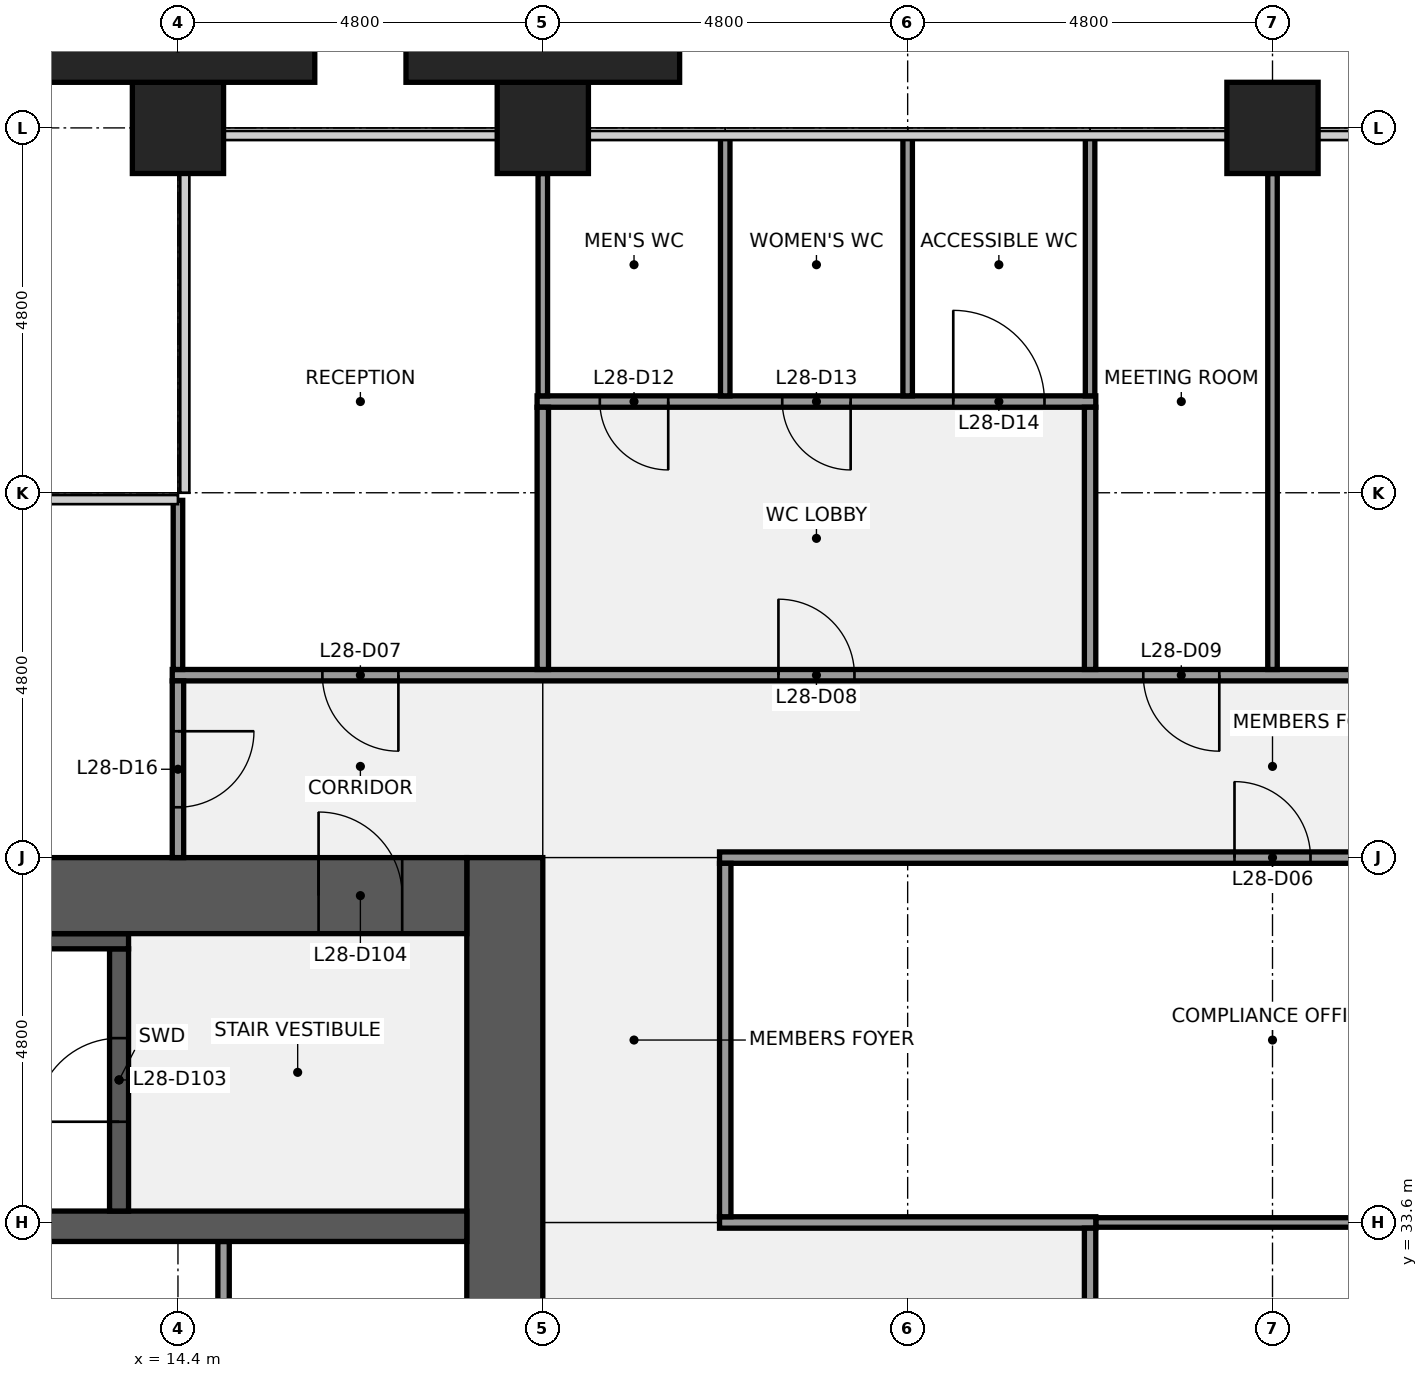
"""IFC4 building model, lengths in metres.
Left out: names, types, materials, properties, quantities, classifications, styles, units other than length and angle.
Written with IfcOpenShell. Run it as: python <this file> out.ifc"""

import sys

from ifc_helpers import new_model, si_unit, direction, frame, frame_2d, origin, origin_2d, place, context, subcontext, project, spatial, rectangle, extrude, element, fill, save


model = new_model("IFC4")
c1 = context("Model", 3, precision=1e-05, world=origin(), true_north=direction((0.0, 1.0)))
c2 = subcontext(c1, "Body", "Model", "MODEL_VIEW")
j1 = project(units=[si_unit("LENGTHUNIT", "METRE"), si_unit("PLANEANGLEUNIT", "RADIAN")], contexts=[c1])
p1 = place(None, origin())
s1 = spatial("IfcSite", under=j1, at=p1, CompositionType="ELEMENT")
p2 = place(p1, origin())
s2 = spatial("IfcBuilding", under=s1, at=p2, CompositionType="ELEMENT")
p3 = place(p2, frame((0.0, 0.0, 132.1)))
s3 = spatial("IfcBuildingStorey", under=s2, at=p3, CompositionType="ELEMENT", Elevation=132.1)
for number, where, z_axis, x_axis in (
    (1, (14.4, 48.0, 0.0), (0.0, 0.0, 1.0), (1.0, 0.0, 0.0)),
    (2, (19.2, 48.0, 0.0), (0.0, 0.0, 1.0), (1.0, 0.0, 0.0)),
    (3, (28.8, 48.0, 0.0), (0.0, 0.0, 1.0), (1.0, 0.0, 0.0)),
):
    element("IfcColumn", number, at=place(p3, frame(where, z_axis=z_axis, x_axis=x_axis)), inside=s3, PredefinedType="COLUMN", context=c2, shape_type="SweptSolid", body=[
        extrude(rectangle(XDim=1.2, YDim=1.2, at=origin_2d()), origin(), (0.0, 0.0, 1.0), 4.0),
    ])
p4 = place(p3, frame((18.7, 38.4, 0.0), z_axis=(0.0, 0.0, 1.0), x_axis=(0.0, -1.0, 0.0)))
e4 = element("IfcWall", 4, at=p4, inside=s3, PredefinedType="SHEAR", context=c2, shape_type="SweptSolid", body=[
    extrude(rectangle(XDim=28.8, YDim=1.0, at=frame_2d((14.4, 0.0))), origin(), (0.0, 0.0, 1.0), 3.84),
])
p5 = place(p4, frame((18.3, 0.0, 0.0)))
e5 = element("IfcOpeningElement", 5, at=p5, cuts=e4, PredefinedType="OPENING", context=c2, shape_type="SweptSolid", body=[
    extrude(rectangle(XDim=1.8, YDim=2.1, at=frame_2d((0.9, 1.05))), frame((0.0, 0.51, 0.0), z_axis=(0.0, -1.0, 0.0), x_axis=(1.0, 0.0, 0.0)), (0.0, 0.0, 1.0), 1.02),
])
p6 = place(p4, frame((8.7, 0.0, 0.0)))
e6 = element("IfcOpeningElement", 6, at=p6, cuts=e4, PredefinedType="OPENING", context=c2, shape_type="SweptSolid", body=[
    extrude(rectangle(XDim=1.8, YDim=2.1, at=frame_2d((0.9, 1.05))), frame((0.0, 0.51, 0.0), z_axis=(0.0, -1.0, 0.0), x_axis=(1.0, 0.0, 0.0)), (0.0, 0.0, 1.0), 1.02),
])
p7 = place(p3, frame((15.0, 30.75, 0.0), z_axis=(0.0, 0.0, 1.0), x_axis=(0.0, 1.0, 0.0)))
e7 = element("IfcWall", 7, at=p7, inside=s3, PredefinedType="PARTITIONING", context=c2, shape_type="SweptSolid", body=[
    extrude(rectangle(XDim=2.6, YDim=0.15, at=frame_2d((1.3, 0.0))), origin(), (0.0, 0.0, 1.0), 3.84),
])
p8 = place(p3, frame((1.0, 33.55, 0.0), z_axis=(0.0, 0.0, 1.0), x_axis=(1.0, 0.0, 0.0)))
e8 = element("IfcWall", 8, at=p8, inside=s3, PredefinedType="SHEAR", context=c2, shape_type="SweptSolid", body=[
    extrude(rectangle(XDim=17.2, YDim=0.4, at=frame_2d((8.6, 0.0))), origin(), (0.0, 0.0, 1.0), 3.84),
])
p9 = place(p3, frame((13.625, 33.75, 0.0), z_axis=(0.0, 0.0, 1.0), x_axis=(0.0, 1.0, 0.0)))
e9 = element("IfcWall", 9, at=p9, inside=s3, PredefinedType="SHEAR", context=c2, shape_type="SweptSolid", body=[
    extrude(rectangle(XDim=3.45, YDim=0.25, at=frame_2d((1.725, 0.0))), origin(), (0.0, 0.0, 1.0), 3.84),
])
p10 = place(p9, frame((1.175, 0.0, 0.0)))
e10 = element("IfcOpeningElement", 10, at=p10, cuts=e9, PredefinedType="OPENING", context=c2, shape_type="SweptSolid", body=[
    extrude(rectangle(XDim=1.1, YDim=2.1, at=frame_2d((0.55, 1.05))), frame((0.0, 0.135, 0.0), z_axis=(0.0, -1.0, 0.0), x_axis=(1.0, 0.0, 0.0)), (0.0, 0.0, 1.0), 0.27),
])
p11 = place(p3, frame((6.25, 37.3, 0.0), z_axis=(0.0, 0.0, 1.0), x_axis=(1.0, 0.0, 0.0)))
e11 = element("IfcWall", 11, at=p11, inside=s3, PredefinedType="SHEAR", context=c2, shape_type="SweptSolid", body=[
    extrude(rectangle(XDim=7.5, YDim=0.2, at=frame_2d((3.75, 0.0))), origin(), (0.0, 0.0, 1.0), 3.84),
])
p12 = place(p3, frame((4.8, 37.9, 0.0), z_axis=(0.0, 0.0, 1.0), x_axis=(1.0, 0.0, 0.0)))
e12 = element("IfcWall", 12, at=p12, inside=s3, PredefinedType="SHEAR", context=c2, shape_type="SweptSolid", body=[
    extrude(rectangle(XDim=13.4, YDim=1.0, at=frame_2d((6.7, 0.0))), origin(), (0.0, 0.0, 1.0), 3.84),
])
p13 = place(p12, frame((11.45, 0.0, 0.0)))
e13 = element("IfcOpeningElement", 13, at=p13, cuts=e12, PredefinedType="OPENING", context=c2, shape_type="SweptSolid", body=[
    extrude(rectangle(XDim=1.1, YDim=2.1, at=frame_2d((0.55, 1.05))), frame((0.0, 0.51, 0.0), z_axis=(0.0, -1.0, 0.0), x_axis=(1.0, 0.0, 0.0)), (0.0, 0.0, 1.0), 1.02),
])
p14 = place(p3, frame((26.475, 33.6, 0.0), z_axis=(0.0, 0.0, 1.0), x_axis=(1.0, 0.0, 0.0)))
e14 = element("IfcWall", 14, at=p14, inside=s3, PredefinedType="PARTITIONING", context=c2, shape_type="SweptSolid", body=[
    extrude(rectangle(XDim=4.8, YDim=0.125, at=frame_2d((2.4, 0.0))), origin(), (0.0, 0.0, 1.0), 2.936),
])
p15 = place(p3, frame((21.525, 33.6, 0.0), z_axis=(0.0, 0.0, 1.0), x_axis=(1.0, 0.0, 0.0)))
e15 = element("IfcWall", 15, at=p15, inside=s3, PredefinedType="PARTITIONING", context=c2, shape_type="SweptSolid", body=[
    extrude(rectangle(XDim=4.95, YDim=0.15, at=frame_2d((2.475, 0.0))), origin(), (0.0, 0.0, 1.0), 2.936),
])
p16 = place(p3, frame((21.525, 38.4, 0.0), z_axis=(0.0, 0.0, 1.0), x_axis=(1.0, 0.0, 0.0)))
e16 = element("IfcWall", 16, at=p16, inside=s3, PredefinedType="PARTITIONING", context=c2, shape_type="SweptSolid", body=[
    extrude(rectangle(XDim=14.55, YDim=0.15, at=frame_2d((7.275, 0.0))), origin(), (0.0, 0.0, 1.0), 2.936),
])
p17 = place(p16, frame((6.775, 0.0, 0.0)))
e17 = element("IfcOpeningElement", 17, at=p17, cuts=e16, PredefinedType="OPENING", context=c2, shape_type="SweptSolid", body=[
    extrude(rectangle(XDim=1.0, YDim=2.1, at=frame_2d((0.5, 1.05))), frame((0.0, 0.085, 0.0), z_axis=(0.0, -1.0, 0.0), x_axis=(1.0, 0.0, 0.0)), (0.0, 0.0, 1.0), 0.17),
])
p18 = place(p3, frame((14.325, 40.8, 0.0), z_axis=(0.0, 0.0, 1.0), x_axis=(1.0, 0.0, 0.0)))
e18 = element("IfcWall", 18, at=p18, inside=s3, PredefinedType="PARTITIONING", context=c2, shape_type="SweptSolid", body=[
    extrude(rectangle(XDim=28.95, YDim=0.15, at=frame_2d((14.475, 0.0))), origin(), (0.0, 0.0, 1.0), 2.936),
])
p19 = place(p18, frame((1.975, 0.0, 0.0)))
e19 = element("IfcOpeningElement", 19, at=p19, cuts=e18, PredefinedType="OPENING", context=c2, shape_type="SweptSolid", body=[
    extrude(rectangle(XDim=1.0, YDim=2.1, at=frame_2d((0.5, 1.05))), frame((0.0, 0.085, 0.0), z_axis=(0.0, -1.0, 0.0), x_axis=(1.0, 0.0, 0.0)), (0.0, 0.0, 1.0), 0.17),
])
p20 = place(p18, frame((7.975, 0.0, 0.0)))
e20 = element("IfcOpeningElement", 20, at=p20, cuts=e18, PredefinedType="OPENING", context=c2, shape_type="SweptSolid", body=[
    extrude(rectangle(XDim=1.0, YDim=2.1, at=frame_2d((0.5, 1.05))), frame((0.0, 0.085, 0.0), z_axis=(0.0, -1.0, 0.0), x_axis=(1.0, 0.0, 0.0)), (0.0, 0.0, 1.0), 0.17),
])
p21 = place(p18, frame((12.775, 0.0, 0.0)))
e21 = element("IfcOpeningElement", 21, at=p21, cuts=e18, PredefinedType="OPENING", context=c2, shape_type="SweptSolid", body=[
    extrude(rectangle(XDim=1.0, YDim=2.1, at=frame_2d((0.5, 1.05))), frame((0.0, 0.085, 0.0), z_axis=(0.0, -1.0, 0.0), x_axis=(1.0, 0.0, 0.0)), (0.0, 0.0, 1.0), 0.17),
])
p22 = place(p18, frame((18.775, 0.0, 0.0)))
e22 = element("IfcOpeningElement", 22, at=p22, cuts=e18, PredefinedType="OPENING", context=c2, shape_type="SweptSolid", body=[
    extrude(rectangle(XDim=1.0, YDim=2.1, at=frame_2d((0.5, 1.05))), frame((0.0, 0.085, 0.0), z_axis=(0.0, -1.0, 0.0), x_axis=(1.0, 0.0, 0.0)), (0.0, 0.0, 1.0), 0.17),
])
p23 = place(p18, frame((25.975, 0.0, 0.0)))
e23 = element("IfcOpeningElement", 23, at=p23, cuts=e18, PredefinedType="OPENING", context=c2, shape_type="SweptSolid", body=[
    extrude(rectangle(XDim=1.0, YDim=2.1, at=frame_2d((0.5, 1.05))), frame((0.0, 0.085, 0.0), z_axis=(0.0, -1.0, 0.0), x_axis=(1.0, 0.0, 0.0)), (0.0, 0.0, 1.0), 0.17),
])
p24 = place(p3, frame((19.125, 44.4, 0.0), z_axis=(0.0, 0.0, 1.0), x_axis=(1.0, 0.0, 0.0)))
e24 = element("IfcWall", 24, at=p24, inside=s3, PredefinedType="PARTITIONING", context=c2, shape_type="SweptSolid", body=[
    extrude(rectangle(XDim=7.35, YDim=0.15, at=frame_2d((3.675, 0.0))), origin(), (0.0, 0.0, 1.0), 2.936),
])
p25 = place(p24, frame((0.825, 0.0, 0.0)))
e25 = element("IfcOpeningElement", 25, at=p25, cuts=e24, PredefinedType="OPENING", context=c2, shape_type="SweptSolid", body=[
    extrude(rectangle(XDim=0.9, YDim=2.1, at=frame_2d((0.45, 1.05))), frame((0.0, 0.085, 0.0), z_axis=(0.0, -1.0, 0.0), x_axis=(1.0, 0.0, 0.0)), (0.0, 0.0, 1.0), 0.17),
])
p26 = place(p24, frame((3.225, 0.0, 0.0)))
e26 = element("IfcOpeningElement", 26, at=p26, cuts=e24, PredefinedType="OPENING", context=c2, shape_type="SweptSolid", body=[
    extrude(rectangle(XDim=0.9, YDim=2.1, at=frame_2d((0.45, 1.05))), frame((0.0, 0.085, 0.0), z_axis=(0.0, -1.0, 0.0), x_axis=(1.0, 0.0, 0.0)), (0.0, 0.0, 1.0), 0.17),
])
p27 = place(p24, frame((5.475, 0.0, 0.0)))
e27 = element("IfcOpeningElement", 27, at=p27, cuts=e24, PredefinedType="OPENING", context=c2, shape_type="SweptSolid", body=[
    extrude(rectangle(XDim=1.2, YDim=2.1, at=frame_2d((0.6, 1.05))), frame((0.0, 0.085, 0.0), z_axis=(0.0, -1.0, 0.0), x_axis=(1.0, 0.0, 0.0)), (0.0, 0.0, 1.0), 0.17),
])
p28 = place(p3, frame((14.4, 40.875, 0.0), z_axis=(0.0, 0.0, 1.0), x_axis=(0.0, 1.0, 0.0)))
e28 = element("IfcWall", 28, at=p28, inside=s3, PredefinedType="PARTITIONING", context=c2, shape_type="SweptSolid", body=[
    extrude(rectangle(XDim=2.225, YDim=0.125, at=frame_2d((1.113, 0.0))), origin(), (0.0, 0.0, 1.0), 2.936),
])
p29 = place(p3, frame((14.4, 38.4, 0.0), z_axis=(0.0, 0.0, 1.0), x_axis=(0.0, 1.0, 0.0)))
e29 = element("IfcWall", 29, at=p29, inside=s3, PredefinedType="PARTITIONING", context=c2, shape_type="SweptSolid", body=[
    extrude(rectangle(XDim=2.325, YDim=0.15, at=frame_2d((1.163, 0.0))), origin(), (0.0, 0.0, 1.0), 2.936),
])
p30 = place(p29, frame((0.663, 0.0, 0.0)))
e30 = element("IfcOpeningElement", 30, at=p30, cuts=e29, PredefinedType="OPENING", context=c2, shape_type="SweptSolid", body=[
    extrude(rectangle(XDim=1.0, YDim=2.1, at=frame_2d((0.5, 1.05))), frame((0.0, 0.085, 0.0), z_axis=(0.0, -1.0, 0.0), x_axis=(1.0, 0.0, 0.0)), (0.0, 0.0, 1.0), 0.17),
])
p31 = place(p3, frame((19.2, 44.475, 0.0), z_axis=(0.0, 0.0, 1.0), x_axis=(0.0, 1.0, 0.0)))
e31 = element("IfcWall", 31, at=p31, inside=s3, PredefinedType="PARTITIONING", context=c2, shape_type="SweptSolid", body=[
    extrude(rectangle(XDim=2.925, YDim=0.125, at=frame_2d((1.462, 0.0))), origin(), (0.0, 0.0, 1.0), 2.936),
])
p32 = place(p3, frame((19.2, 40.875, 0.0), z_axis=(0.0, 0.0, 1.0), x_axis=(0.0, 1.0, 0.0)))
e32 = element("IfcWall", 32, at=p32, inside=s3, PredefinedType="PARTITIONING", context=c2, shape_type="SweptSolid", body=[
    extrude(rectangle(XDim=3.45, YDim=0.15, at=frame_2d((1.725, 0.0))), origin(), (0.0, 0.0, 1.0), 2.936),
])
p33 = place(p3, frame((21.6, 44.475, 0.0), z_axis=(0.0, 0.0, 1.0), x_axis=(0.0, 1.0, 0.0)))
e33 = element("IfcWall", 33, at=p33, inside=s3, PredefinedType="PARTITIONING", context=c2, shape_type="SweptSolid", body=[
    extrude(rectangle(XDim=3.425, YDim=0.125, at=frame_2d((1.712, 0.0))), origin(), (0.0, 0.0, 1.0), 2.936),
])
p34 = place(p3, frame((21.6, 33.675, 0.0), z_axis=(0.0, 0.0, 1.0), x_axis=(0.0, 1.0, 0.0)))
e34 = element("IfcWall", 34, at=p34, inside=s3, PredefinedType="PARTITIONING", context=c2, shape_type="SweptSolid", body=[
    extrude(rectangle(XDim=4.65, YDim=0.15, at=frame_2d((2.325, 0.0))), origin(), (0.0, 0.0, 1.0), 2.936),
])
for number, where, z_axis, x_axis in (
    (35, (24.0, 44.475, 0.0), (0.0, 0.0, 1.0), (0.0, 1.0, 0.0)),
    (36, (26.4, 44.475, 0.0), (0.0, 0.0, 1.0), (0.0, 1.0, 0.0)),
):
    element("IfcWall", number, at=place(p3, frame(where, z_axis=z_axis, x_axis=x_axis)), inside=s3, PredefinedType="PARTITIONING", context=c2, shape_type="SweptSolid", body=[
        extrude(rectangle(XDim=3.425, YDim=0.125, at=frame_2d((1.712, 0.0))), origin(), (0.0, 0.0, 1.0), 2.936),
    ])
p35 = place(p3, frame((26.4, 27.675, 0.0), z_axis=(0.0, 0.0, 1.0), x_axis=(0.0, 1.0, 0.0)))
e37 = element("IfcWall", 37, at=p35, inside=s3, PredefinedType="PARTITIONING", context=c2, shape_type="SweptSolid", body=[
    extrude(rectangle(XDim=5.85, YDim=0.15, at=frame_2d((2.925, 0.0))), origin(), (0.0, 0.0, 1.0), 2.936),
])
p36 = place(p35, frame((2.425, 0.0, 0.0)))
e38 = element("IfcOpeningElement", 38, at=p36, cuts=e37, PredefinedType="OPENING", context=c2, shape_type="SweptSolid", body=[
    extrude(rectangle(XDim=1.0, YDim=2.1, at=frame_2d((0.5, 1.05))), frame((0.0, 0.085, 0.0), z_axis=(0.0, -1.0, 0.0), x_axis=(1.0, 0.0, 0.0)), (0.0, 0.0, 1.0), 0.17),
])
p37 = place(p3, frame((26.4, 40.875, 0.0), z_axis=(0.0, 0.0, 1.0), x_axis=(0.0, 1.0, 0.0)))
e39 = element("IfcWall", 39, at=p37, inside=s3, PredefinedType="PARTITIONING", context=c2, shape_type="SweptSolid", body=[
    extrude(rectangle(XDim=3.45, YDim=0.15, at=frame_2d((1.725, 0.0))), origin(), (0.0, 0.0, 1.0), 2.936),
])
p38 = place(p3, frame((28.8, 40.875, 0.0), z_axis=(0.0, 0.0, 1.0), x_axis=(0.0, 1.0, 0.0)))
e40 = element("IfcWall", 40, at=p38, inside=s3, PredefinedType="PARTITIONING", context=c2, shape_type="SweptSolid", body=[
    extrude(rectangle(XDim=6.525, YDim=0.125, at=frame_2d((3.262, 0.0))), origin(), (0.0, 0.0, 1.0), 2.936),
])
for number, where, z_axis, x_axis in (
    (41, (14.4, 49.05, 0.0), (0.0, 0.0, 1.0), (1.0, 0.0, 0.0)),
    (42, (19.2, 49.05, 0.0), (0.0, 0.0, 1.0), (1.0, 0.0, 0.0)),
):
    element("IfcColumn", number, at=place(p3, frame(where, z_axis=z_axis, x_axis=x_axis)), inside=s3, PredefinedType="PILASTER", context=c2, shape_type="SweptSolid", body=[
        extrude(rectangle(XDim=3.6, YDim=0.9, at=origin_2d()), origin(), (0.0, 0.0, 1.0), 4.0),
    ])
p39 = place(p10, origin())
e43 = element("IfcDoor", 43, at=p39, inside=s3, OperationType="SINGLE_SWING_LEFT", PredefinedType="DOOR", context=c2, shape_type="SweptSolid", body=[
    extrude(rectangle(XDim=1.1, YDim=2.1, at=frame_2d((0.55, 1.05))), frame((0.0, 0.025, 0.0), z_axis=(0.0, -1.0, 0.0), x_axis=(1.0, 0.0, 0.0)), (0.0, 0.0, 1.0), 0.05),
])
fill(e10, e43)
p40 = place(p13, origin())
e44 = element("IfcDoor", 44, at=p40, inside=s3, OperationType="SINGLE_SWING_LEFT", PredefinedType="DOOR", context=c2, shape_type="SweptSolid", body=[
    extrude(rectangle(XDim=1.1, YDim=2.1, at=frame_2d((0.55, 1.05))), frame((0.0, 0.025, 0.0), z_axis=(0.0, -1.0, 0.0), x_axis=(1.0, 0.0, 0.0)), (0.0, 0.0, 1.0), 0.05),
])
fill(e13, e44)
p41 = place(p17, origin())
e45 = element("IfcDoor", 45, at=p41, inside=s3, OperationType="SINGLE_SWING_LEFT", PredefinedType="DOOR", context=c2, shape_type="SweptSolid", body=[
    extrude(rectangle(XDim=1.0, YDim=2.1, at=frame_2d((0.5, 1.05))), frame((0.0, 0.025, 0.0), z_axis=(0.0, -1.0, 0.0), x_axis=(1.0, 0.0, 0.0)), (0.0, 0.0, 1.0), 0.05),
])
fill(e17, e45)
p42 = place(p19, origin())
e46 = element("IfcDoor", 46, at=p42, inside=s3, OperationType="SINGLE_SWING_RIGHT", PredefinedType="DOOR", context=c2, shape_type="SweptSolid", body=[
    extrude(rectangle(XDim=1.0, YDim=2.1, at=frame_2d((0.5, 1.05))), frame((0.0, 0.025, 0.0), z_axis=(0.0, -1.0, 0.0), x_axis=(1.0, 0.0, 0.0)), (0.0, 0.0, 1.0), 0.05),
])
fill(e19, e46)
p43 = place(p20, origin())
e47 = element("IfcDoor", 47, at=p43, inside=s3, OperationType="SINGLE_SWING_LEFT", PredefinedType="DOOR", context=c2, shape_type="SweptSolid", body=[
    extrude(rectangle(XDim=1.0, YDim=2.1, at=frame_2d((0.5, 1.05))), frame((0.0, 0.025, 0.0), z_axis=(0.0, -1.0, 0.0), x_axis=(1.0, 0.0, 0.0)), (0.0, 0.0, 1.0), 0.05),
])
fill(e20, e47)
p44 = place(p21, origin())
e48 = element("IfcDoor", 48, at=p44, inside=s3, OperationType="SINGLE_SWING_RIGHT", PredefinedType="DOOR", context=c2, shape_type="SweptSolid", body=[
    extrude(rectangle(XDim=1.0, YDim=2.1, at=frame_2d((0.5, 1.05))), frame((0.0, 0.025, 0.0), z_axis=(0.0, -1.0, 0.0), x_axis=(1.0, 0.0, 0.0)), (0.0, 0.0, 1.0), 0.05),
])
fill(e21, e48)
p45 = place(p25, origin())
e49 = element("IfcDoor", 49, at=p45, inside=s3, OperationType="SINGLE_SWING_RIGHT", PredefinedType="DOOR", context=c2, shape_type="SweptSolid", body=[
    extrude(rectangle(XDim=0.9, YDim=2.1, at=frame_2d((0.45, 1.05))), frame((0.0, 0.025, 0.0), z_axis=(0.0, -1.0, 0.0), x_axis=(1.0, 0.0, 0.0)), (0.0, 0.0, 1.0), 0.05),
])
fill(e25, e49)
p46 = place(p26, origin())
e50 = element("IfcDoor", 50, at=p46, inside=s3, OperationType="SINGLE_SWING_RIGHT", PredefinedType="DOOR", context=c2, shape_type="SweptSolid", body=[
    extrude(rectangle(XDim=0.9, YDim=2.1, at=frame_2d((0.45, 1.05))), frame((0.0, 0.025, 0.0), z_axis=(0.0, -1.0, 0.0), x_axis=(1.0, 0.0, 0.0)), (0.0, 0.0, 1.0), 0.05),
])
fill(e26, e50)
p47 = place(p27, origin())
e51 = element("IfcDoor", 51, at=p47, inside=s3, OperationType="SINGLE_SWING_LEFT", PredefinedType="DOOR", context=c2, shape_type="SweptSolid", body=[
    extrude(rectangle(XDim=1.2, YDim=2.1, at=frame_2d((0.6, 1.05))), frame((0.0, 0.025, 0.0), z_axis=(0.0, -1.0, 0.0), x_axis=(1.0, 0.0, 0.0)), (0.0, 0.0, 1.0), 0.05),
])
fill(e27, e51)
p48 = place(p30, origin())
e52 = element("IfcDoor", 52, at=p48, inside=s3, OperationType="SINGLE_SWING_RIGHT", PredefinedType="DOOR", context=c2, shape_type="SweptSolid", body=[
    extrude(rectangle(XDim=1.0, YDim=2.1, at=frame_2d((0.5, 1.05))), frame((0.0, 0.025, 0.0), z_axis=(0.0, -1.0, 0.0), x_axis=(1.0, 0.0, 0.0)), (0.0, 0.0, 1.0), 0.05),
])
fill(e30, e52)
save(model, sys.argv[1])
